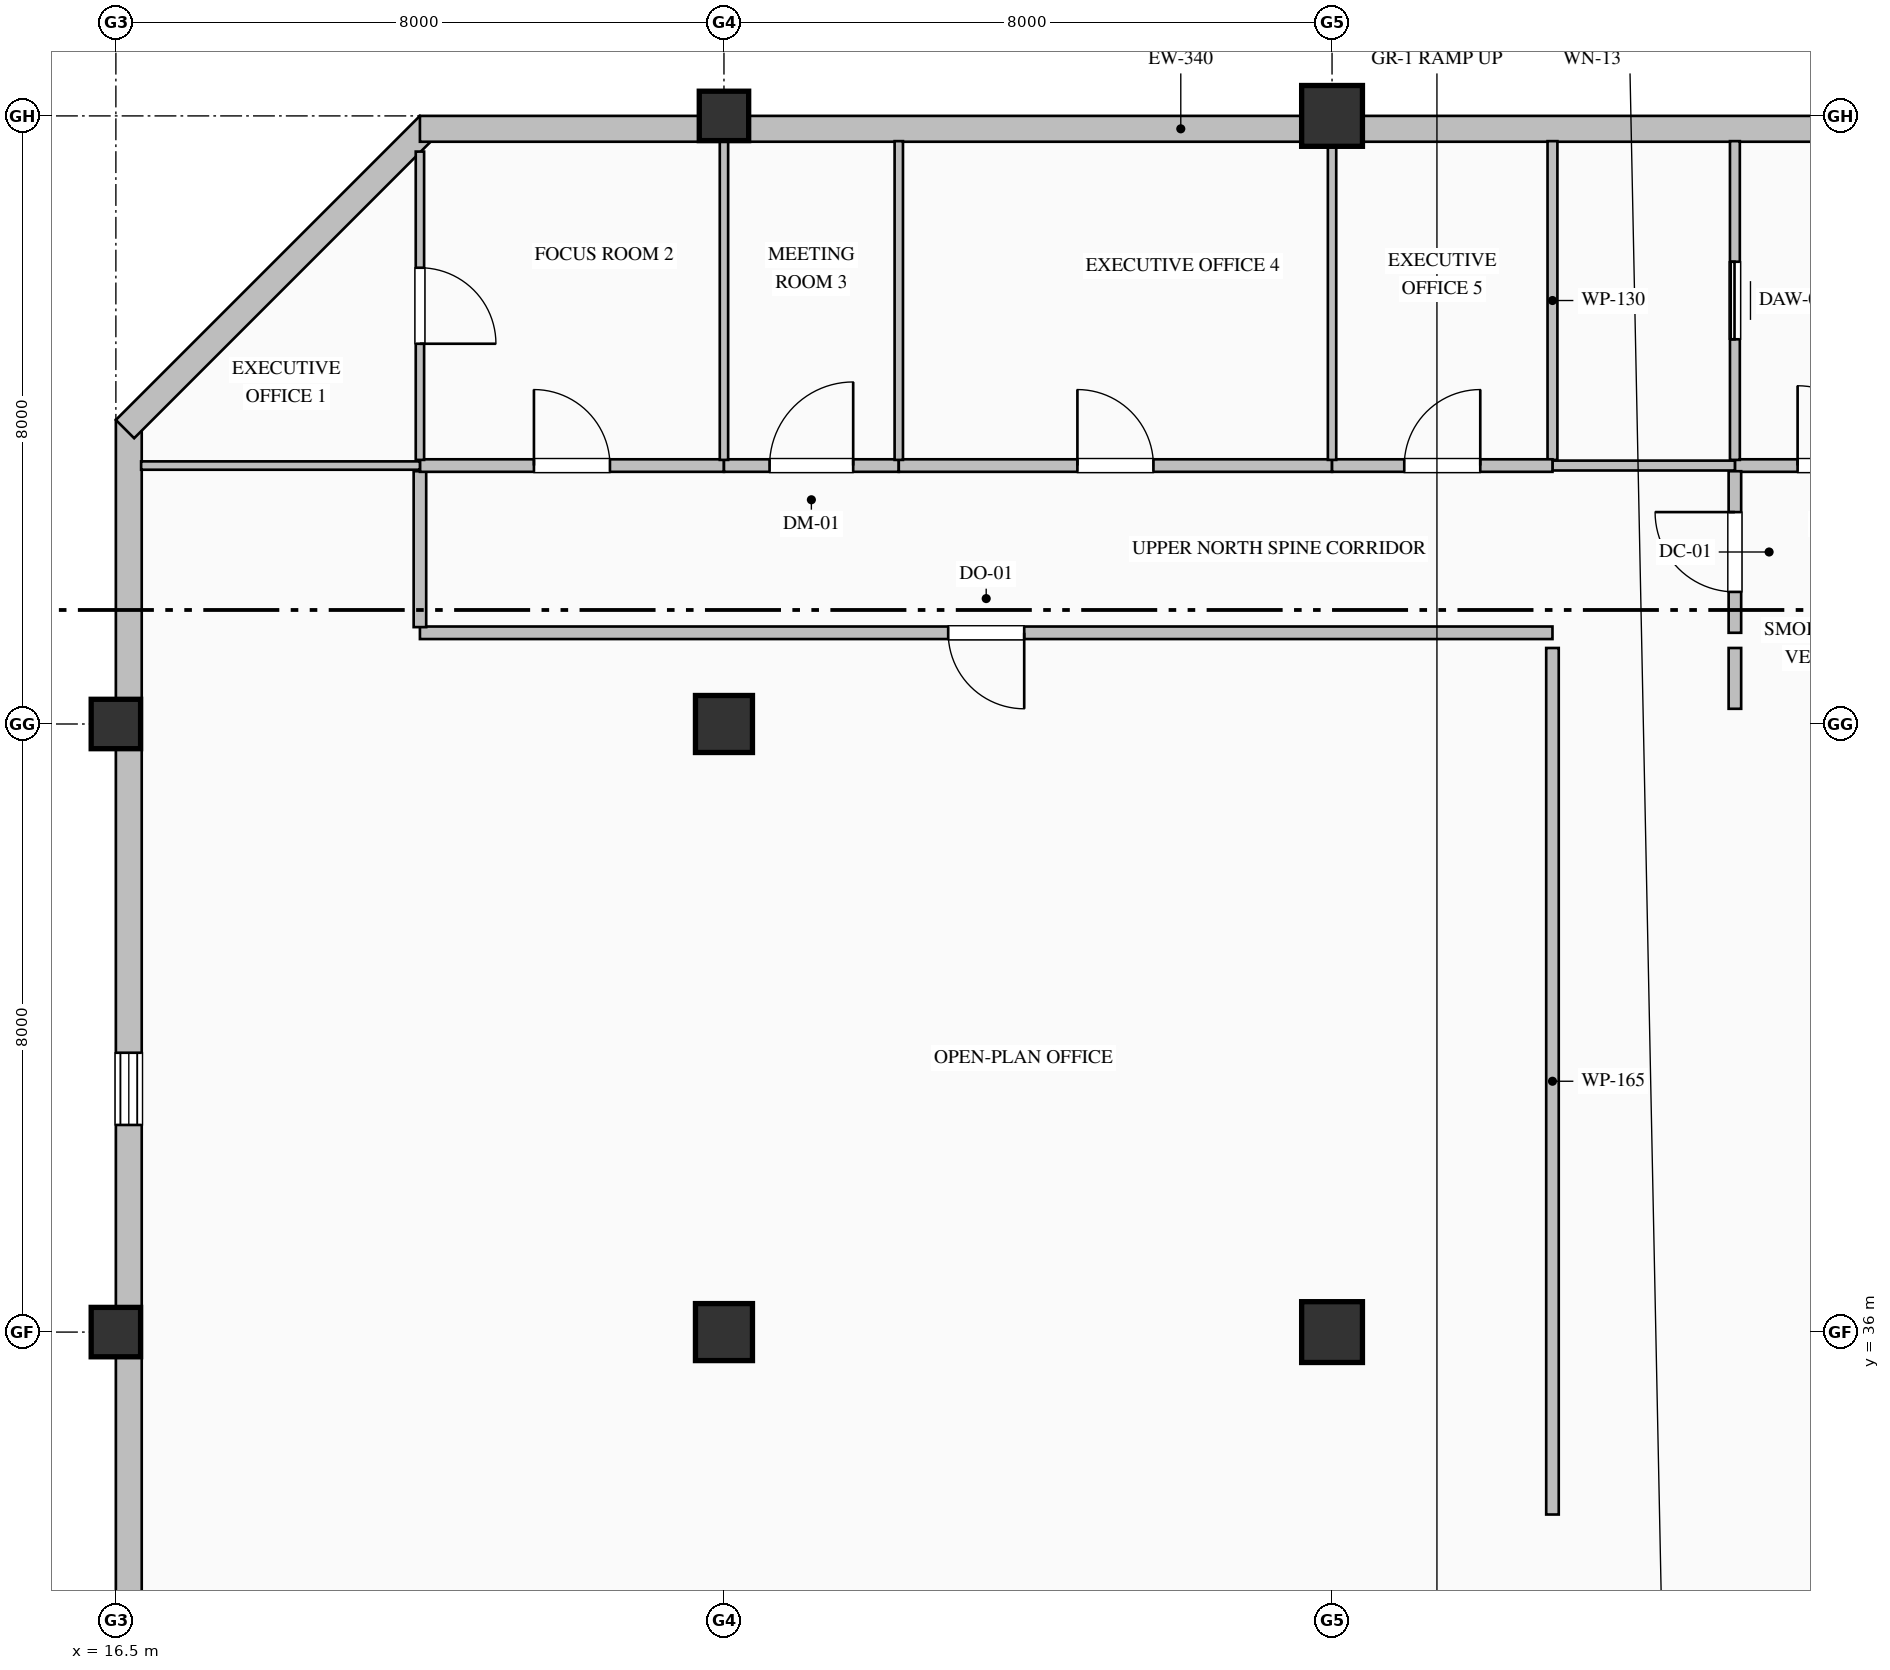
"""IFC4 building model, lengths in metres.
Left out: names, types, materials, properties, quantities, classifications, styles, units other than length and angle.
Written with IfcOpenShell. Run it as: python <this file> out.ifc"""

import sys

from ifc_helpers import new_model, si_unit, direction, frame, frame_2d, origin, origin_2d, place, context, subcontext, project, spatial, rectangle, hollow_rectangle, extrude, element, fill, save


model = new_model("IFC4")
c1 = context("Model", 3, precision=1e-05, world=origin(), true_north=direction((0.0, 1.0)))
c2 = subcontext(c1, "Body", "Model", "MODEL_VIEW")
j1 = project(units=[si_unit("LENGTHUNIT", "METRE"), si_unit("PLANEANGLEUNIT", "RADIAN")], contexts=[c1])
p1 = place(None, origin())
s1 = spatial("IfcSite", under=j1, at=p1, CompositionType="ELEMENT")
p2 = place(p1, origin())
s2 = spatial("IfcBuilding", under=s1, at=p2, CompositionType="ELEMENT")
p3 = place(p2, frame((0.0, 0.0, 295.2)))
s3 = spatial("IfcBuildingStorey", under=s2, at=p3, CompositionType="ELEMENT", Elevation=295.2)
for number, where, z_axis, x_axis in (
    (1, (16.5, 36.0, 0.0), (0.0, 0.0, 1.0), (1.0, 0.0, 0.0)),
    (2, (16.5, 44.0, 0.0), (0.0, 0.0, 1.0), (1.0, 0.0, 0.0)),
):
    element("IfcColumn", number, at=place(p3, frame(where, z_axis=z_axis, x_axis=x_axis)), inside=s3, PredefinedType="COLUMN", context=c2, shape_type="SweptSolid", body=[
        extrude(hollow_rectangle(XDim=0.65, YDim=0.65, WallThickness=0.028, at=origin_2d()), origin(), (0.0, 0.0, 1.0), 4.0),
    ])
for number, where, z_axis, x_axis in (
    (3, (24.5, 36.0, 0.0), (0.0, 0.0, 1.0), (1.0, 0.0, 0.0)),
    (4, (24.5, 44.0, 0.0), (0.0, 0.0, 1.0), (1.0, 0.0, 0.0)),
):
    element("IfcColumn", number, at=place(p3, frame(where, z_axis=z_axis, x_axis=x_axis)), inside=s3, PredefinedType="COLUMN", context=c2, shape_type="SweptSolid", body=[
        extrude(rectangle(XDim=0.75, YDim=0.75, at=origin_2d()), origin(), (0.0, 0.0, 1.0), 4.0),
    ])
p4 = place(p3, frame((24.5, 52.0, 0.0), z_axis=(0.0, 0.0, 1.0), x_axis=(1.0, 0.0, 0.0)))
e5 = element("IfcColumn", 5, at=p4, inside=s3, PredefinedType="COLUMN", context=c2, shape_type="SweptSolid", body=[
    extrude(hollow_rectangle(XDim=0.65, YDim=0.65, WallThickness=0.028, at=origin_2d()), origin(), (0.0, 0.0, 1.0), 4.0),
])
for number, where, z_axis, x_axis in (
    (6, (32.5, 36.0, 0.0), (0.0, 0.0, 1.0), (1.0, 0.0, 0.0)),
    (7, (32.5, 52.0, 0.0), (0.0, 0.0, 1.0), (1.0, 0.0, 0.0)),
):
    element("IfcColumn", number, at=place(p3, frame(where, z_axis=z_axis, x_axis=x_axis)), inside=s3, PredefinedType="COLUMN", context=c2, shape_type="SweptSolid", body=[
        extrude(hollow_rectangle(XDim=0.8, YDim=0.8, WallThickness=0.032, at=origin_2d()), origin(), (0.0, 0.0, 1.0), 4.0),
    ])
p5 = place(p3, frame((16.67, 32.0, 0.0), z_axis=(0.0, 0.0, 1.0), x_axis=(0.0, 1.0, 0.0)))
e8 = element("IfcWall", 8, at=p5, inside=s3, PredefinedType="SOLIDWALL", context=c2, shape_type="SweptSolid", body=[
    extrude(rectangle(XDim=16.0, YDim=0.34, at=frame_2d((8.0, 0.0))), origin(), (0.0, 0.0, 1.0), 3.335),
])
p6 = place(p5, frame((6.725, 0.0, 0.9)))
e9 = element("IfcOpeningElement", 9, at=p6, cuts=e8, PredefinedType="OPENING", context=c2, shape_type="SweptSolid", body=[
    extrude(rectangle(XDim=0.95, YDim=1.85, at=frame_2d((0.475, 0.925))), frame((0.0, 0.18, 0.0), z_axis=(0.0, -1.0, 0.0), x_axis=(1.0, 0.0, 0.0)), (0.0, 0.0, 1.0), 0.36),
])
p7 = place(p3, frame((16.62, 47.88, 0.0), z_axis=(0.0, 0.0, 1.0), x_axis=(0.707106781187, 0.707106781187, 0.0)))
e10 = element("IfcWall", 10, at=p7, inside=s3, PredefinedType="SOLIDWALL", context=c2, shape_type="SweptSolid", body=[
    extrude(rectangle(XDim=5.657, YDim=0.34, at=frame_2d((2.828, 0.0))), origin(), (0.0, 0.0, 1.0), 3.785),
])
p8 = place(p3, frame((20.5, 51.83, 0.0), z_axis=(0.0, 0.0, 1.0), x_axis=(1.0, 0.0, 0.0)))
e11 = element("IfcWall", 11, at=p8, inside=s3, PredefinedType="SOLIDWALL", context=c2, shape_type="SweptSolid", body=[
    extrude(rectangle(XDim=20.02, YDim=0.34, at=frame_2d((10.01, 0.0))), origin(), (0.0, 0.0, 1.0), 3.335),
])
p9 = place(p3, frame((37.8, 47.4, 0.0), z_axis=(0.0, 0.0, 1.0), x_axis=(1.0, 0.0, 0.0)))
e12 = element("IfcWall", 12, at=p9, inside=s3, PredefinedType="PARTITIONING", context=c2, shape_type="SweptSolid", body=[
    extrude(rectangle(XDim=2.7, YDim=0.165, at=frame_2d((1.35, 0.0))), origin(), (0.0, 0.0, 1.0), 3.785),
])
p10 = place(p9, frame((0.825, 0.0, 0.0)))
e13 = element("IfcOpeningElement", 13, at=p10, cuts=e12, PredefinedType="OPENING", context=c2, shape_type="SweptSolid", body=[
    extrude(rectangle(XDim=1.05, YDim=2.15, at=frame_2d((0.525, 1.075))), frame((0.0, 0.093, 0.0), z_axis=(0.0, -1.0, 0.0), x_axis=(1.0, 0.0, 0.0)), (0.0, 0.0, 1.0), 0.185),
])
p11 = place(p3, frame((37.8, 45.2, 0.0), z_axis=(0.0, 0.0, 1.0), x_axis=(0.0, 1.0, 0.0)))
e14 = element("IfcWall", 14, at=p11, inside=s3, PredefinedType="PARTITIONING", context=c2, shape_type="SweptSolid", body=[
    extrude(rectangle(XDim=2.125, YDim=0.165, at=frame_2d((1.063, 0.0))), origin(), (0.0, 0.0, 1.0), 3.785),
])
p12 = place(p11, frame((0.538, 0.0, 0.0)))
e15 = element("IfcOpeningElement", 15, at=p12, cuts=e14, PredefinedType="OPENING", context=c2, shape_type="SweptSolid", body=[
    extrude(rectangle(XDim=1.05, YDim=2.15, at=frame_2d((0.525, 1.075))), frame((0.0, 0.093, 0.0), z_axis=(0.0, -1.0, 0.0), x_axis=(1.0, 0.0, 0.0)), (0.0, 0.0, 1.0), 0.185),
])
p13 = place(p3, frame((37.8, 44.2, 0.0), z_axis=(0.0, 0.0, 1.0), x_axis=(0.0, 1.0, 0.0)))
e16 = element("IfcWall", 16, at=p13, inside=s3, PredefinedType="PARTITIONING", context=c2, shape_type="SweptSolid", body=[
    extrude(rectangle(XDim=0.8, YDim=0.165, at=frame_2d((0.4, 0.0))), origin(), (0.0, 0.0, 1.0), 3.785),
])
p14 = place(p3, frame((37.8, 47.475, 0.0), z_axis=(0.0, 0.0, 1.0), x_axis=(0.0, 1.0, 0.0)))
e17 = element("IfcWall", 17, at=p14, inside=s3, PredefinedType="PARTITIONING", context=c2, shape_type="SweptSolid", body=[
    extrude(rectangle(XDim=4.193, YDim=0.13, at=frame_2d((2.097, 0.0))), origin(), (0.0, 0.0, 1.0), 3.785),
])
p15 = place(p14, frame((1.587, 0.0, 0.0)))
e18 = element("IfcOpeningElement", 18, at=p15, cuts=e17, PredefinedType="OPENING", context=c2, shape_type="SweptSolid", body=[
    extrude(rectangle(XDim=1.02, YDim=2.15, at=frame_2d((0.51, 1.075))), frame((0.0, 0.075, 0.0), z_axis=(0.0, -1.0, 0.0), x_axis=(1.0, 0.0, 0.0)), (0.0, 0.0, 1.0), 0.15),
])
p16 = place(p3, frame((37.8, 47.4, 0.0), z_axis=(0.0, 0.0, 1.0), x_axis=(-1.0, 0.0, 0.0)))
e19 = element("IfcWall", 19, at=p16, inside=s3, PredefinedType="PARTITIONING", context=c2, shape_type="SweptSolid", body=[
    extrude(rectangle(XDim=2.4, YDim=0.13, at=frame_2d((1.2, 0.0))), origin(), (0.0, 0.0, 1.0), 3.785),
])
p17 = place(p3, frame((35.4, 47.475, 0.0), z_axis=(0.0, 0.0, 1.0), x_axis=(0.0, 1.0, 0.0)))
e20 = element("IfcWall", 20, at=p17, inside=s3, PredefinedType="PARTITIONING", context=c2, shape_type="SweptSolid", body=[
    extrude(rectangle(XDim=4.193, YDim=0.13, at=frame_2d((2.097, 0.0))), origin(), (0.0, 0.0, 1.0), 3.785),
])
p18 = place(p3, frame((35.4, 45.2, 0.0), z_axis=(0.0, 0.0, 1.0), x_axis=(-1.0, 0.0, 0.0)))
e21 = element("IfcWall", 21, at=p18, inside=s3, PredefinedType="PARTITIONING", context=c2, shape_type="SweptSolid", body=[
    extrude(rectangle(XDim=14.9, YDim=0.165, at=frame_2d((7.45, 0.0))), origin(), (0.0, 0.0, 1.0), 3.785),
])
p19 = place(p18, frame((6.95, 0.0, 0.0)))
e22 = element("IfcOpeningElement", 22, at=p19, cuts=e21, PredefinedType="OPENING", context=c2, shape_type="SweptSolid", body=[
    extrude(rectangle(XDim=1.0, YDim=2.15, at=frame_2d((0.5, 1.075))), frame((0.0, 0.093, 0.0), z_axis=(0.0, -1.0, 0.0), x_axis=(1.0, 0.0, 0.0)), (0.0, 0.0, 1.0), 0.185),
])
p20 = place(p3, frame((20.5, 45.274, 0.0), z_axis=(0.0, 0.0, 1.0), x_axis=(0.0, 1.0, 0.0)))
e23 = element("IfcWall", 23, at=p20, inside=s3, PredefinedType="PARTITIONING", context=c2, shape_type="SweptSolid", body=[
    extrude(rectangle(XDim=2.051, YDim=0.165, at=frame_2d((1.025, 0.0))), origin(), (0.0, 0.0, 1.0), 3.785),
])
p21 = place(p3, frame((20.5, 47.4, 0.0), z_axis=(0.0, 0.0, 1.0), x_axis=(1.0, 0.0, 0.0)))
e24 = element("IfcWall", 24, at=p21, inside=s3, PredefinedType="PARTITIONING", context=c2, shape_type="SweptSolid", body=[
    extrude(rectangle(XDim=4.0, YDim=0.165, at=frame_2d((2.0, 0.0))), origin(), (0.0, 0.0, 1.0), 3.785),
])
p22 = place(p21, frame((1.5, 0.0, 0.0)))
e25 = element("IfcOpeningElement", 25, at=p22, cuts=e24, PredefinedType="OPENING", context=c2, shape_type="SweptSolid", body=[
    extrude(rectangle(XDim=1.0, YDim=2.15, at=frame_2d((0.5, 1.075))), frame((0.0, 0.093, 0.0), z_axis=(0.0, -1.0, 0.0), x_axis=(1.0, 0.0, 0.0)), (0.0, 0.0, 1.0), 0.185),
])
p23 = place(p3, frame((24.5, 47.4, 0.0), z_axis=(0.0, 0.0, 1.0), x_axis=(1.0, 0.0, 0.0)))
e26 = element("IfcWall", 26, at=p23, inside=s3, PredefinedType="PARTITIONING", context=c2, shape_type="SweptSolid", body=[
    extrude(rectangle(XDim=2.3, YDim=0.165, at=frame_2d((1.15, 0.0))), origin(), (0.0, 0.0, 1.0), 3.785),
])
p24 = place(p23, frame((0.6, 0.0, 0.0)))
e27 = element("IfcOpeningElement", 27, at=p24, cuts=e26, PredefinedType="OPENING", context=c2, shape_type="SweptSolid", body=[
    extrude(rectangle(XDim=1.1, YDim=2.2, at=frame_2d((0.55, 1.1))), frame((0.0, 0.093, 0.0), z_axis=(0.0, -1.0, 0.0), x_axis=(1.0, 0.0, 0.0)), (0.0, 0.0, 1.0), 0.185),
])
p25 = place(p3, frame((26.8, 47.4, 0.0), z_axis=(0.0, 0.0, 1.0), x_axis=(1.0, 0.0, 0.0)))
e28 = element("IfcWall", 28, at=p25, inside=s3, PredefinedType="PARTITIONING", context=c2, shape_type="SweptSolid", body=[
    extrude(rectangle(XDim=5.7, YDim=0.165, at=frame_2d((2.85, 0.0))), origin(), (0.0, 0.0, 1.0), 3.785),
])
p26 = place(p25, frame((2.35, 0.0, 0.0)))
e29 = element("IfcOpeningElement", 29, at=p26, cuts=e28, PredefinedType="OPENING", context=c2, shape_type="SweptSolid", body=[
    extrude(rectangle(XDim=1.0, YDim=2.15, at=frame_2d((0.5, 1.075))), frame((0.0, 0.093, 0.0), z_axis=(0.0, -1.0, 0.0), x_axis=(1.0, 0.0, 0.0)), (0.0, 0.0, 1.0), 0.185),
])
p27 = place(p3, frame((32.5, 47.4, 0.0), z_axis=(0.0, 0.0, 1.0), x_axis=(1.0, 0.0, 0.0)))
e30 = element("IfcWall", 30, at=p27, inside=s3, PredefinedType="PARTITIONING", context=c2, shape_type="SweptSolid", body=[
    extrude(rectangle(XDim=2.9, YDim=0.165, at=frame_2d((1.45, 0.0))), origin(), (0.0, 0.0, 1.0), 3.785),
])
p28 = place(p27, frame((0.95, 0.0, 0.0)))
e31 = element("IfcOpeningElement", 31, at=p28, cuts=e30, PredefinedType="OPENING", context=c2, shape_type="SweptSolid", body=[
    extrude(rectangle(XDim=1.0, YDim=2.15, at=frame_2d((0.5, 1.075))), frame((0.0, 0.093, 0.0), z_axis=(0.0, -1.0, 0.0), x_axis=(1.0, 0.0, 0.0)), (0.0, 0.0, 1.0), 0.185),
])
p29 = place(p3, frame((35.4, 33.6, 0.0), z_axis=(0.0, 0.0, 1.0), x_axis=(0.0, 1.0, 0.0)))
e32 = element("IfcWall", 32, at=p29, inside=s3, PredefinedType="PARTITIONING", context=c2, shape_type="SweptSolid", body=[
    extrude(rectangle(XDim=11.4, YDim=0.165, at=frame_2d((5.7, 0.0))), origin(), (0.0, 0.0, 1.0), 3.785),
])
p30 = place(p3, frame((16.832, 47.4, 0.0), z_axis=(0.0, 0.0, 1.0), x_axis=(1.0, 0.0, 0.0)))
e33 = element("IfcWall", 33, at=p30, inside=s3, PredefinedType="MOVABLE", context=c2, shape_type="SweptSolid", body=[
    extrude(rectangle(XDim=3.668, YDim=0.11, at=frame_2d((1.834, 0.0))), origin(), (0.0, 0.0, 1.0), 3.785),
])
p31 = place(p3, frame((20.5, 51.531, 0.0), z_axis=(0.0, 0.0, 1.0), x_axis=(0.0, -1.0, 0.0)))
e34 = element("IfcWall", 34, at=p31, inside=s3, PredefinedType="MOVABLE", context=c2, shape_type="SweptSolid", body=[
    extrude(rectangle(XDim=4.056, YDim=0.11, at=frame_2d((2.028, 0.0))), origin(), (0.0, 0.0, 1.0), 3.785),
])
p32 = place(p31, frame((1.528, 0.0, 0.0)))
e35 = element("IfcOpeningElement", 35, at=p32, cuts=e34, PredefinedType="OPENING", context=c2, shape_type="SweptSolid", body=[
    extrude(rectangle(XDim=1.0, YDim=2.15, at=frame_2d((0.5, 1.075))), frame((0.0, 0.065, 0.0), z_axis=(0.0, -1.0, 0.0), x_axis=(1.0, 0.0, 0.0)), (0.0, 0.0, 1.0), 0.13),
])
p33 = place(p3, frame((24.5, 51.668, 0.0), z_axis=(0.0, 0.0, 1.0), x_axis=(0.0, -1.0, 0.0)))
e36 = element("IfcWall", 36, at=p33, inside=s3, PredefinedType="MOVABLE", context=c2, shape_type="SweptSolid", body=[
    extrude(rectangle(XDim=4.193, YDim=0.11, at=frame_2d((2.097, 0.0))), origin(), (0.0, 0.0, 1.0), 3.177),
])
for number, where, z_axis, x_axis in (
    (37, (26.8, 51.668, 0.0), (0.0, 0.0, 1.0), (0.0, -1.0, 0.0)),
    (38, (32.5, 51.668, 0.0), (0.0, 0.0, 1.0), (0.0, -1.0, 0.0)),
):
    element("IfcWall", number, at=place(p3, frame(where, z_axis=z_axis, x_axis=x_axis)), inside=s3, PredefinedType="MOVABLE", context=c2, shape_type="SweptSolid", body=[
        extrude(rectangle(XDim=4.193, YDim=0.11, at=frame_2d((2.097, 0.0))), origin(), (0.0, 0.0, 1.0), 3.785),
    ])
p34 = place(p6, origin())
e39 = element("IfcWindow", 39, at=p34, inside=s3, PartitioningType="SINGLE_PANEL", PredefinedType="WINDOW", context=c2, shape_type="SweptSolid", body=[
    extrude(rectangle(XDim=0.95, YDim=1.85, at=frame_2d((0.475, 0.925))), frame((0.0, 0.15, 0.0), z_axis=(0.0, -1.0, 0.0), x_axis=(1.0, 0.0, 0.0)), (0.0, 0.0, 1.0), 0.06),
])
fill(e9, e39)
p35 = place(p10, origin())
e40 = element("IfcDoor", 40, at=p35, inside=s3, OperationType="SINGLE_SWING_LEFT", PredefinedType="DOOR", context=c2, shape_type="SweptSolid", body=[
    extrude(rectangle(XDim=1.05, YDim=2.15, at=frame_2d((0.525, 1.075))), frame((0.0, 0.025, 0.0), z_axis=(0.0, -1.0, 0.0), x_axis=(1.0, 0.0, 0.0)), (0.0, 0.0, 1.0), 0.05),
])
fill(e13, e40)
p36 = place(p12, origin())
e41 = element("IfcDoor", 41, at=p36, inside=s3, OperationType="SINGLE_SWING_RIGHT", PredefinedType="DOOR", context=c2, shape_type="SweptSolid", body=[
    extrude(rectangle(XDim=1.05, YDim=2.15, at=frame_2d((0.525, 1.075))), frame((0.0, 0.025, 0.0), z_axis=(0.0, -1.0, 0.0), x_axis=(1.0, 0.0, 0.0)), (0.0, 0.0, 1.0), 0.05),
])
fill(e15, e41)
p37 = place(p15, origin())
e42 = element("IfcDoor", 42, at=p37, inside=s3, OperationType="SLIDING_TO_LEFT", PredefinedType="DOOR", context=c2, shape_type="SweptSolid", body=[
    extrude(rectangle(XDim=1.02, YDim=2.15, at=frame_2d((0.51, 1.075))), frame((0.0, 0.025, 0.0), z_axis=(0.0, -1.0, 0.0), x_axis=(1.0, 0.0, 0.0)), (0.0, 0.0, 1.0), 0.05),
])
fill(e18, e42)
p38 = place(p19, origin())
e43 = element("IfcDoor", 43, at=p38, inside=s3, OperationType="SINGLE_SWING_LEFT", PredefinedType="DOOR", context=c2, shape_type="SweptSolid", body=[
    extrude(rectangle(XDim=1.0, YDim=2.15, at=frame_2d((0.5, 1.075))), frame((0.0, 0.025, 0.0), z_axis=(0.0, -1.0, 0.0), x_axis=(1.0, 0.0, 0.0)), (0.0, 0.0, 1.0), 0.05),
])
fill(e22, e43)
p39 = place(p32, origin())
e44 = element("IfcDoor", 44, at=p39, inside=s3, OperationType="SINGLE_SWING_RIGHT", PredefinedType="DOOR", context=c2, shape_type="SweptSolid", body=[
    extrude(rectangle(XDim=1.0, YDim=2.15, at=frame_2d((0.5, 1.075))), frame((0.0, 0.025, 0.0), z_axis=(0.0, -1.0, 0.0), x_axis=(1.0, 0.0, 0.0)), (0.0, 0.0, 1.0), 0.05),
])
fill(e35, e44)
p40 = place(p22, origin())
e45 = element("IfcDoor", 45, at=p40, inside=s3, OperationType="SINGLE_SWING_LEFT", PredefinedType="DOOR", context=c2, shape_type="SweptSolid", body=[
    extrude(rectangle(XDim=1.0, YDim=2.15, at=frame_2d((0.5, 1.075))), frame((0.0, 0.025, 0.0), z_axis=(0.0, -1.0, 0.0), x_axis=(1.0, 0.0, 0.0)), (0.0, 0.0, 1.0), 0.05),
])
fill(e25, e45)
p41 = place(p24, origin())
e46 = element("IfcDoor", 46, at=p41, inside=s3, OperationType="SINGLE_SWING_RIGHT", PredefinedType="DOOR", context=c2, shape_type="SweptSolid", body=[
    extrude(rectangle(XDim=1.1, YDim=2.2, at=frame_2d((0.55, 1.1))), frame((0.0, 0.025, 0.0), z_axis=(0.0, -1.0, 0.0), x_axis=(1.0, 0.0, 0.0)), (0.0, 0.0, 1.0), 0.05),
])
fill(e27, e46)
p42 = place(p26, origin())
e47 = element("IfcDoor", 47, at=p42, inside=s3, OperationType="SINGLE_SWING_LEFT", PredefinedType="DOOR", context=c2, shape_type="SweptSolid", body=[
    extrude(rectangle(XDim=1.0, YDim=2.15, at=frame_2d((0.5, 1.075))), frame((0.0, 0.025, 0.0), z_axis=(0.0, -1.0, 0.0), x_axis=(1.0, 0.0, 0.0)), (0.0, 0.0, 1.0), 0.05),
])
fill(e29, e47)
p43 = place(p28, origin())
e48 = element("IfcDoor", 48, at=p43, inside=s3, OperationType="SINGLE_SWING_RIGHT", PredefinedType="DOOR", context=c2, shape_type="SweptSolid", body=[
    extrude(rectangle(XDim=1.0, YDim=2.15, at=frame_2d((0.5, 1.075))), frame((0.0, 0.025, 0.0), z_axis=(0.0, -1.0, 0.0), x_axis=(1.0, 0.0, 0.0)), (0.0, 0.0, 1.0), 0.05),
])
fill(e31, e48)
save(model, sys.argv[1])
